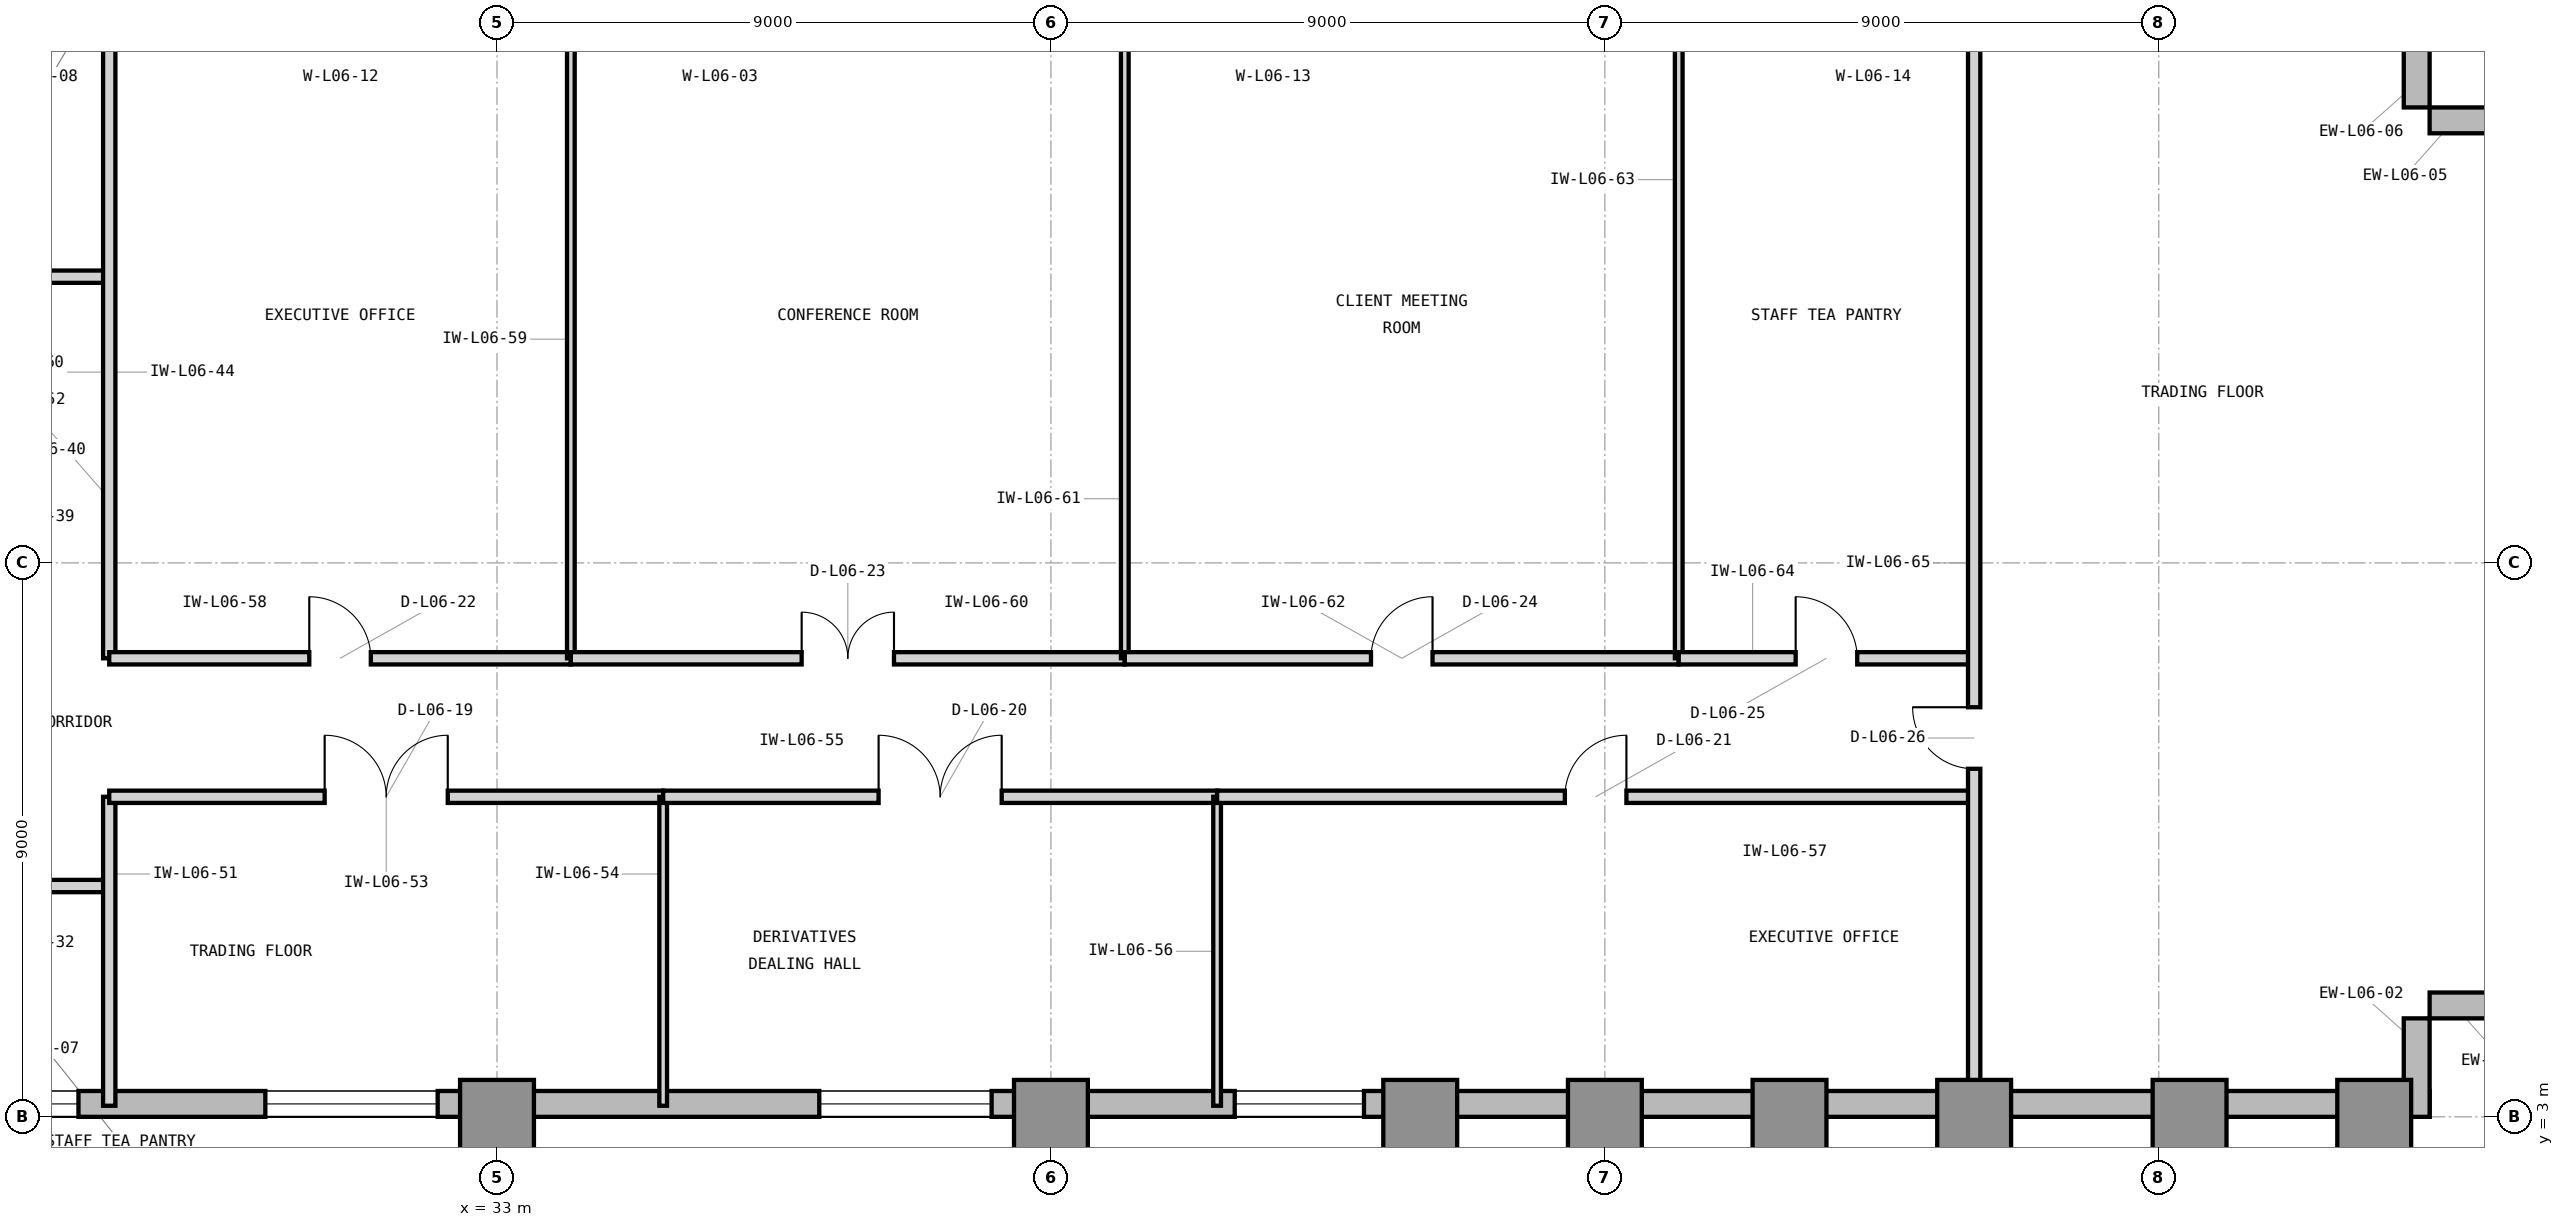
"""IFC4 building model, lengths in metres.
Left out: names, types, materials, properties, quantities, classifications, styles, units other than length and angle.
Written with IfcOpenShell. Run it as: python <this file> out.ifc"""

import sys

from ifc_helpers import new_model, si_unit, direction, frame, frame_2d, origin, origin_2d, place, context, subcontext, project, spatial, rectangle, extrude, element, fill, save


model = new_model("IFC4")
c1 = context("Model", 3, precision=1e-05, world=origin(), true_north=direction((0.0, 1.0)))
c2 = subcontext(c1, "Body", "Model", "MODEL_VIEW")
j1 = project(units=[si_unit("LENGTHUNIT", "METRE"), si_unit("PLANEANGLEUNIT", "RADIAN")], contexts=[c1])
p1 = place(None, origin())
s1 = spatial("IfcSite", under=j1, at=p1, CompositionType="ELEMENT")
p2 = place(p1, origin())
s2 = spatial("IfcBuilding", under=s1, at=p2, CompositionType="ELEMENT")
p3 = place(p2, frame((0.0, 0.0, 30.0)))
s3 = spatial("IfcBuildingStorey", under=s2, at=p3, CompositionType="ELEMENT", Elevation=30.0)
for number, where, z_axis, x_axis in (
    (1, (33.0, 3.0, 0.0), (0.0, 0.0, 1.0), (1.0, 0.0, 0.0)),
    (2, (42.0, 3.0, 0.0), (0.0, 0.0, 1.0), (1.0, 0.0, 0.0)),
    (3, (48.0, 3.0, 0.0), (0.0, 0.0, 1.0), (1.0, 0.0, 0.0)),
    (4, (51.0, 3.0, 0.0), (0.0, 0.0, 1.0), (1.0, 0.0, 0.0)),
    (5, (54.0, 3.0, 0.0), (0.0, 0.0, 1.0), (1.0, 0.0, 0.0)),
    (6, (57.0, 3.0, 0.0), (0.0, 0.0, 1.0), (1.0, 0.0, 0.0)),
    (7, (60.5, 3.0, 0.0), (0.0, 0.0, 1.0), (1.0, 0.0, 0.0)),
    (8, (63.5, 3.0, 0.0), (0.0, 0.0, 1.0), (1.0, 0.0, 0.0)),
):
    element("IfcColumn", number, at=place(p3, frame(where, z_axis=z_axis, x_axis=x_axis)), inside=s3, PredefinedType="COLUMN", context=c2, shape_type="SweptSolid", body=[
        extrude(rectangle(XDim=1.2, YDim=1.2, at=origin_2d()), origin(), (0.0, 0.0, 1.0), 4.2),
    ])
p4 = place(p3, frame((23.9, 3.21, 0.0), z_axis=(0.0, 0.0, 1.0), x_axis=(1.0, 0.0, 0.0)))
e9 = element("IfcWall", 9, at=p4, inside=s3, PredefinedType="STANDARD", context=c2, shape_type="SweptSolid", body=[
    extrude(rectangle(XDim=40.5, YDim=0.42, at=frame_2d((20.25, 0.0))), origin(), (0.0, 0.0, 1.0), 3.98),
])
p5 = place(p4, frame((1.1, 0.0, 0.85)))
e10 = element("IfcOpeningElement", 10, at=p5, cuts=e9, PredefinedType="OPENING", context=c2, shape_type="SweptSolid", body=[
    extrude(rectangle(XDim=1.2, YDim=2.45, at=frame_2d((0.6, 1.225))), frame((0.0, 0.22, 0.0), z_axis=(0.0, -1.0, 0.0), x_axis=(1.0, 0.0, 0.0)), (0.0, 0.0, 1.0), 0.44),
])
p6 = place(p4, frame((5.336, 0.0, 0.85)))
e11 = element("IfcOpeningElement", 11, at=p6, cuts=e9, PredefinedType="OPENING", context=c2, shape_type="SweptSolid", body=[
    extrude(rectangle(XDim=2.8, YDim=2.45, at=frame_2d((1.4, 1.225))), frame((0.0, 0.22, 0.0), z_axis=(0.0, -1.0, 0.0), x_axis=(1.0, 0.0, 0.0)), (0.0, 0.0, 1.0), 0.44),
])
p7 = place(p4, frame((14.336, 0.0, 0.85)))
e12 = element("IfcOpeningElement", 12, at=p7, cuts=e9, PredefinedType="OPENING", context=c2, shape_type="SweptSolid", body=[
    extrude(rectangle(XDim=2.8, YDim=2.45, at=frame_2d((1.4, 1.225))), frame((0.0, 0.22, 0.0), z_axis=(0.0, -1.0, 0.0), x_axis=(1.0, 0.0, 0.0)), (0.0, 0.0, 1.0), 0.44),
])
p8 = place(p4, frame((21.086, 0.0, 0.85)))
e13 = element("IfcOpeningElement", 13, at=p8, cuts=e9, PredefinedType="OPENING", context=c2, shape_type="SweptSolid", body=[
    extrude(rectangle(XDim=2.1, YDim=2.45, at=frame_2d((1.05, 1.225))), frame((0.0, 0.22, 0.0), z_axis=(0.0, -1.0, 0.0), x_axis=(1.0, 0.0, 0.0)), (0.0, 0.0, 1.0), 0.44),
])
for number, where, z_axis, x_axis in (
    (14, (64.19, 3.0, 0.0), (0.0, 0.0, 1.0), (0.0, 1.0, 0.0)),
    (15, (64.4, 4.81, 0.0), (0.0, 0.0, 1.0), (1.0, 0.0, 0.0)),
    (16, (66.0, 19.19, 0.0), (0.0, 0.0, 1.0), (-1.0, 0.0, 0.0)),
    (17, (64.19, 19.4, 0.0), (0.0, 0.0, 1.0), (0.0, 1.0, 0.0)),
):
    element("IfcWall", number, at=place(p3, frame(where, z_axis=z_axis, x_axis=x_axis)), inside=s3, PredefinedType="STANDARD", context=c2, shape_type="SweptSolid", body=[
        extrude(rectangle(XDim=1.6, YDim=0.42, at=frame_2d((0.8, 0.0))), origin(), (0.0, 0.0, 1.0), 3.98),
    ])
p9 = place(p3, frame((23.85, 6.75, 0.0), z_axis=(0.0, 0.0, 1.0), x_axis=(1.0, 0.0, 0.0)))
e18 = element("IfcWall", 18, at=p9, inside=s3, PredefinedType="PARTITIONING", context=c2, shape_type="SweptSolid", body=[
    extrude(rectangle(XDim=2.85, YDim=0.2, at=frame_2d((1.425, 0.0))), origin(), (0.0, 0.0, 1.0), 3.97),
])
p10 = place(p9, frame((0.7, 0.0, 0.0)))
e19 = element("IfcOpeningElement", 19, at=p10, cuts=e18, PredefinedType="OPENING", context=c2, shape_type="SweptSolid", body=[
    extrude(rectangle(XDim=1.0, YDim=2.15, at=frame_2d((0.5, 1.075))), frame((0.0, 0.11, 0.0), z_axis=(0.0, -1.0, 0.0), x_axis=(1.0, 0.0, 0.0)), (0.0, 0.0, 1.0), 0.22),
])
p11 = place(p3, frame((23.85, 16.65, 0.0), z_axis=(0.0, 0.0, 1.0), x_axis=(1.0, 0.0, 0.0)))
e20 = element("IfcWall", 20, at=p11, inside=s3, PredefinedType="PARTITIONING", context=c2, shape_type="SweptSolid", body=[
    extrude(rectangle(XDim=2.85, YDim=0.2, at=frame_2d((1.425, 0.0))), origin(), (0.0, 0.0, 1.0), 3.97),
])
p12 = place(p11, frame((0.7, 0.0, 0.0)))
e21 = element("IfcOpeningElement", 21, at=p12, cuts=e20, PredefinedType="OPENING", context=c2, shape_type="SweptSolid", body=[
    extrude(rectangle(XDim=1.0, YDim=2.15, at=frame_2d((0.5, 1.075))), frame((0.0, 0.11, 0.0), z_axis=(0.0, -1.0, 0.0), x_axis=(1.0, 0.0, 0.0)), (0.0, 0.0, 1.0), 0.22),
])
p13 = place(p3, frame((26.7, 3.18, 0.0), z_axis=(0.0, 0.0, 1.0), x_axis=(0.0, 1.0, 0.0)))
e22 = element("IfcWall", 22, at=p13, inside=s3, PredefinedType="PARTITIONING", context=c2, shape_type="SweptSolid", body=[
    extrude(rectangle(XDim=5.02, YDim=0.2, at=frame_2d((2.51, 0.0))), origin(), (0.0, 0.0, 1.0), 3.97),
])
p14 = place(p3, frame((26.7, 10.45, 0.0), z_axis=(0.0, 0.0, 1.0), x_axis=(0.0, 1.0, 0.0)))
e23 = element("IfcWall", 23, at=p14, inside=s3, PredefinedType="PARTITIONING", context=c2, shape_type="SweptSolid", body=[
    extrude(rectangle(XDim=10.37, YDim=0.2, at=frame_2d((5.185, 0.0))), origin(), (0.0, 0.0, 1.0), 3.97),
])
p15 = place(p3, frame((26.7, 8.2, 0.0), z_axis=(0.0, 0.0, 1.0), x_axis=(1.0, 0.0, 0.0)))
e24 = element("IfcWall", 24, at=p15, inside=s3, PredefinedType="PARTITIONING", context=c2, shape_type="SweptSolid", body=[
    extrude(rectangle(XDim=9.0, YDim=0.2, at=frame_2d((4.5, 0.0))), origin(), (0.0, 0.0, 1.0), 3.97),
])
p16 = place(p15, frame((3.5, 0.0, 0.0)))
e25 = element("IfcOpeningElement", 25, at=p16, cuts=e24, PredefinedType="OPENING", context=c2, shape_type="SweptSolid", body=[
    extrude(rectangle(XDim=2.0, YDim=2.5, at=frame_2d((1.0, 1.25))), frame((0.0, 0.11, 0.0), z_axis=(0.0, -1.0, 0.0), x_axis=(1.0, 0.0, 0.0)), (0.0, 0.0, 1.0), 0.22),
])
p17 = place(p3, frame((35.7, 3.18, 0.0), z_axis=(0.0, 0.0, 1.0), x_axis=(0.0, 1.0, 0.0)))
e26 = element("IfcWall", 26, at=p17, inside=s3, PredefinedType="PARTITIONING", context=c2, shape_type="SweptSolid", body=[
    extrude(rectangle(XDim=5.02, YDim=0.125, at=frame_2d((2.51, 0.0))), origin(), (0.0, 0.0, 1.0), 3.97),
])
p18 = place(p3, frame((35.7, 8.2, 0.0), z_axis=(0.0, 0.0, 1.0), x_axis=(1.0, 0.0, 0.0)))
e27 = element("IfcWall", 27, at=p18, inside=s3, PredefinedType="PARTITIONING", context=c2, shape_type="SweptSolid", body=[
    extrude(rectangle(XDim=9.0, YDim=0.2, at=frame_2d((4.5, 0.0))), origin(), (0.0, 0.0, 1.0), 3.97),
])
p19 = place(p18, frame((3.5, 0.0, 0.0)))
e28 = element("IfcOpeningElement", 28, at=p19, cuts=e27, PredefinedType="OPENING", context=c2, shape_type="SweptSolid", body=[
    extrude(rectangle(XDim=2.0, YDim=2.5, at=frame_2d((1.0, 1.25))), frame((0.0, 0.11, 0.0), z_axis=(0.0, -1.0, 0.0), x_axis=(1.0, 0.0, 0.0)), (0.0, 0.0, 1.0), 0.22),
])
p20 = place(p3, frame((44.7, 3.18, 0.0), z_axis=(0.0, 0.0, 1.0), x_axis=(0.0, 1.0, 0.0)))
e29 = element("IfcWall", 29, at=p20, inside=s3, PredefinedType="PARTITIONING", context=c2, shape_type="SweptSolid", body=[
    extrude(rectangle(XDim=5.02, YDim=0.125, at=frame_2d((2.51, 0.0))), origin(), (0.0, 0.0, 1.0), 3.97),
])
p21 = place(p3, frame((44.7, 8.2, 0.0), z_axis=(0.0, 0.0, 1.0), x_axis=(1.0, 0.0, 0.0)))
e30 = element("IfcWall", 30, at=p21, inside=s3, PredefinedType="PARTITIONING", context=c2, shape_type="SweptSolid", body=[
    extrude(rectangle(XDim=12.3, YDim=0.2, at=frame_2d((6.15, 0.0))), origin(), (0.0, 0.0, 1.0), 3.97),
])
p22 = place(p21, frame((5.65, 0.0, 0.0)))
e31 = element("IfcOpeningElement", 31, at=p22, cuts=e30, PredefinedType="OPENING", context=c2, shape_type="SweptSolid", body=[
    extrude(rectangle(XDim=1.0, YDim=2.15, at=frame_2d((0.5, 1.075))), frame((0.0, 0.11, 0.0), z_axis=(0.0, -1.0, 0.0), x_axis=(1.0, 0.0, 0.0)), (0.0, 0.0, 1.0), 0.22),
])
p23 = place(p3, frame((26.7, 10.45, 0.0), z_axis=(0.0, 0.0, 1.0), x_axis=(1.0, 0.0, 0.0)))
e32 = element("IfcWall", 32, at=p23, inside=s3, PredefinedType="PARTITIONING", context=c2, shape_type="SweptSolid", body=[
    extrude(rectangle(XDim=7.5, YDim=0.2, at=frame_2d((3.75, 0.0))), origin(), (0.0, 0.0, 1.0), 3.97),
])
p24 = place(p23, frame((3.25, 0.0, 0.0)))
e33 = element("IfcOpeningElement", 33, at=p24, cuts=e32, PredefinedType="OPENING", context=c2, shape_type="SweptSolid", body=[
    extrude(rectangle(XDim=1.0, YDim=2.15, at=frame_2d((0.5, 1.075))), frame((0.0, 0.11, 0.0), z_axis=(0.0, -1.0, 0.0), x_axis=(1.0, 0.0, 0.0)), (0.0, 0.0, 1.0), 0.22),
])
p25 = place(p3, frame((34.2, 10.45, 0.0), z_axis=(0.0, 0.0, 1.0), x_axis=(0.0, 1.0, 0.0)))
e34 = element("IfcWall", 34, at=p25, inside=s3, PredefinedType="PARTITIONING", context=c2, shape_type="SweptSolid", body=[
    extrude(rectangle(XDim=10.37, YDim=0.125, at=frame_2d((5.185, 0.0))), origin(), (0.0, 0.0, 1.0), 3.97),
])
p26 = place(p3, frame((34.2, 10.45, 0.0), z_axis=(0.0, 0.0, 1.0), x_axis=(1.0, 0.0, 0.0)))
e35 = element("IfcWall", 35, at=p26, inside=s3, PredefinedType="PARTITIONING", context=c2, shape_type="SweptSolid", body=[
    extrude(rectangle(XDim=9.0, YDim=0.2, at=frame_2d((4.5, 0.0))), origin(), (0.0, 0.0, 1.0), 3.97),
])
p27 = place(p26, frame((3.75, 0.0, 0.0)))
e36 = element("IfcOpeningElement", 36, at=p27, cuts=e35, PredefinedType="OPENING", context=c2, shape_type="SweptSolid", body=[
    extrude(rectangle(XDim=1.5, YDim=2.3, at=frame_2d((0.75, 1.15))), frame((0.0, 0.11, 0.0), z_axis=(0.0, -1.0, 0.0), x_axis=(1.0, 0.0, 0.0)), (0.0, 0.0, 1.0), 0.22),
])
p28 = place(p3, frame((43.2, 10.45, 0.0), z_axis=(0.0, 0.0, 1.0), x_axis=(0.0, 1.0, 0.0)))
e37 = element("IfcWall", 37, at=p28, inside=s3, PredefinedType="PARTITIONING", context=c2, shape_type="SweptSolid", body=[
    extrude(rectangle(XDim=10.37, YDim=0.125, at=frame_2d((5.185, 0.0))), origin(), (0.0, 0.0, 1.0), 3.97),
])
p29 = place(p3, frame((43.2, 10.45, 0.0), z_axis=(0.0, 0.0, 1.0), x_axis=(1.0, 0.0, 0.0)))
e38 = element("IfcWall", 38, at=p29, inside=s3, PredefinedType="PARTITIONING", context=c2, shape_type="SweptSolid", body=[
    extrude(rectangle(XDim=9.0, YDim=0.2, at=frame_2d((4.5, 0.0))), origin(), (0.0, 0.0, 1.0), 3.97),
])
p30 = place(p29, frame((4.0, 0.0, 0.0)))
e39 = element("IfcOpeningElement", 39, at=p30, cuts=e38, PredefinedType="OPENING", context=c2, shape_type="SweptSolid", body=[
    extrude(rectangle(XDim=1.0, YDim=2.15, at=frame_2d((0.5, 1.075))), frame((0.0, 0.11, 0.0), z_axis=(0.0, -1.0, 0.0), x_axis=(1.0, 0.0, 0.0)), (0.0, 0.0, 1.0), 0.22),
])
p31 = place(p3, frame((52.2, 10.45, 0.0), z_axis=(0.0, 0.0, 1.0), x_axis=(0.0, 1.0, 0.0)))
e40 = element("IfcWall", 40, at=p31, inside=s3, PredefinedType="PARTITIONING", context=c2, shape_type="SweptSolid", body=[
    extrude(rectangle(XDim=10.37, YDim=0.125, at=frame_2d((5.185, 0.0))), origin(), (0.0, 0.0, 1.0), 3.97),
])
p32 = place(p3, frame((52.2, 10.45, 0.0), z_axis=(0.0, 0.0, 1.0), x_axis=(1.0, 0.0, 0.0)))
e41 = element("IfcWall", 41, at=p32, inside=s3, PredefinedType="PARTITIONING", context=c2, shape_type="SweptSolid", body=[
    extrude(rectangle(XDim=4.8, YDim=0.2, at=frame_2d((2.4, 0.0))), origin(), (0.0, 0.0, 1.0), 3.97),
])
p33 = place(p32, frame((1.9, 0.0, 0.0)))
e42 = element("IfcOpeningElement", 42, at=p33, cuts=e41, PredefinedType="OPENING", context=c2, shape_type="SweptSolid", body=[
    extrude(rectangle(XDim=1.0, YDim=2.15, at=frame_2d((0.5, 1.075))), frame((0.0, 0.11, 0.0), z_axis=(0.0, -1.0, 0.0), x_axis=(1.0, 0.0, 0.0)), (0.0, 0.0, 1.0), 0.22),
])
p34 = place(p3, frame((57.0, 3.18, 0.0), z_axis=(0.0, 0.0, 1.0), x_axis=(0.0, 1.0, 0.0)))
e43 = element("IfcWall", 43, at=p34, inside=s3, PredefinedType="PARTITIONING", context=c2, shape_type="SweptSolid", body=[
    extrude(rectangle(XDim=17.64, YDim=0.2, at=frame_2d((8.82, 0.0))), origin(), (0.0, 0.0, 1.0), 3.114),
])
p35 = place(p34, frame((5.475, 0.0, 0.0)))
e44 = element("IfcOpeningElement", 44, at=p35, cuts=e43, PredefinedType="OPENING", context=c2, shape_type="SweptSolid", body=[
    extrude(rectangle(XDim=1.0, YDim=2.15, at=frame_2d((0.5, 1.075))), frame((0.0, 0.11, 0.0), z_axis=(0.0, -1.0, 0.0), x_axis=(1.0, 0.0, 0.0)), (0.0, 0.0, 1.0), 0.22),
])
p36 = place(p16, origin())
e45 = element("IfcDoor", 45, at=p36, inside=s3, OperationType="DOUBLE_DOOR_SINGLE_SWING", PredefinedType="DOOR", context=c2, shape_type="SweptSolid", body=[
    extrude(rectangle(XDim=2.0, YDim=2.5, at=frame_2d((1.0, 1.25))), frame((0.0, 0.025, 0.0), z_axis=(0.0, -1.0, 0.0), x_axis=(1.0, 0.0, 0.0)), (0.0, 0.0, 1.0), 0.05),
])
fill(e25, e45)
p37 = place(p19, origin())
e46 = element("IfcDoor", 46, at=p37, inside=s3, OperationType="DOUBLE_DOOR_SINGLE_SWING", PredefinedType="DOOR", context=c2, shape_type="SweptSolid", body=[
    extrude(rectangle(XDim=2.0, YDim=2.5, at=frame_2d((1.0, 1.25))), frame((0.0, 0.025, 0.0), z_axis=(0.0, -1.0, 0.0), x_axis=(1.0, 0.0, 0.0)), (0.0, 0.0, 1.0), 0.05),
])
fill(e28, e46)
p38 = place(p22, origin())
e47 = element("IfcDoor", 47, at=p38, inside=s3, OperationType="SINGLE_SWING_RIGHT", PredefinedType="DOOR", context=c2, shape_type="SweptSolid", body=[
    extrude(rectangle(XDim=1.0, YDim=2.15, at=frame_2d((0.5, 1.075))), frame((0.0, 0.025, 0.0), z_axis=(0.0, -1.0, 0.0), x_axis=(1.0, 0.0, 0.0)), (0.0, 0.0, 1.0), 0.05),
])
fill(e31, e47)
p39 = place(p24, origin())
e48 = element("IfcDoor", 48, at=p39, inside=s3, OperationType="SINGLE_SWING_LEFT", PredefinedType="DOOR", context=c2, shape_type="SweptSolid", body=[
    extrude(rectangle(XDim=1.0, YDim=2.15, at=frame_2d((0.5, 1.075))), frame((0.0, 0.025, 0.0), z_axis=(0.0, -1.0, 0.0), x_axis=(1.0, 0.0, 0.0)), (0.0, 0.0, 1.0), 0.05),
])
fill(e33, e48)
p40 = place(p27, origin())
e49 = element("IfcDoor", 49, at=p40, inside=s3, OperationType="DOUBLE_DOOR_SINGLE_SWING", PredefinedType="DOOR", context=c2, shape_type="SweptSolid", body=[
    extrude(rectangle(XDim=1.5, YDim=2.3, at=frame_2d((0.75, 1.15))), frame((0.0, 0.025, 0.0), z_axis=(0.0, -1.0, 0.0), x_axis=(1.0, 0.0, 0.0)), (0.0, 0.0, 1.0), 0.05),
])
fill(e36, e49)
p41 = place(p30, origin())
e50 = element("IfcDoor", 50, at=p41, inside=s3, OperationType="SINGLE_SWING_RIGHT", PredefinedType="DOOR", context=c2, shape_type="SweptSolid", body=[
    extrude(rectangle(XDim=1.0, YDim=2.15, at=frame_2d((0.5, 1.075))), frame((0.0, 0.025, 0.0), z_axis=(0.0, -1.0, 0.0), x_axis=(1.0, 0.0, 0.0)), (0.0, 0.0, 1.0), 0.05),
])
fill(e39, e50)
p42 = place(p33, origin())
e51 = element("IfcDoor", 51, at=p42, inside=s3, OperationType="SINGLE_SWING_LEFT", PredefinedType="DOOR", context=c2, shape_type="SweptSolid", body=[
    extrude(rectangle(XDim=1.0, YDim=2.15, at=frame_2d((0.5, 1.075))), frame((0.0, 0.025, 0.0), z_axis=(0.0, -1.0, 0.0), x_axis=(1.0, 0.0, 0.0)), (0.0, 0.0, 1.0), 0.05),
])
fill(e42, e51)
p43 = place(p35, origin())
e52 = element("IfcDoor", 52, at=p43, inside=s3, OperationType="SINGLE_SWING_RIGHT", PredefinedType="DOOR", context=c2, shape_type="SweptSolid", body=[
    extrude(rectangle(XDim=1.0, YDim=2.15, at=frame_2d((0.5, 1.075))), frame((0.0, 0.025, 0.0), z_axis=(0.0, -1.0, 0.0), x_axis=(1.0, 0.0, 0.0)), (0.0, 0.0, 1.0), 0.05),
])
fill(e44, e52)
p44 = place(p5, origin())
e53 = element("IfcWindow", 53, at=p44, inside=s3, PartitioningType="SINGLE_PANEL", PredefinedType="WINDOW", context=c2, shape_type="SweptSolid", body=[
    extrude(rectangle(XDim=1.2, YDim=2.45, at=frame_2d((0.6, 1.225))), frame((0.0, 0.11, 0.0), z_axis=(0.0, -1.0, 0.0), x_axis=(1.0, 0.0, 0.0)), (0.0, 0.0, 1.0), 0.06),
])
fill(e10, e53)
p45 = place(p6, origin())
e54 = element("IfcWindow", 54, at=p45, inside=s3, PartitioningType="SINGLE_PANEL", PredefinedType="WINDOW", context=c2, shape_type="SweptSolid", body=[
    extrude(rectangle(XDim=2.8, YDim=2.45, at=frame_2d((1.4, 1.225))), frame((0.0, 0.11, 0.0), z_axis=(0.0, -1.0, 0.0), x_axis=(1.0, 0.0, 0.0)), (0.0, 0.0, 1.0), 0.06),
])
fill(e11, e54)
p46 = place(p7, origin())
e55 = element("IfcWindow", 55, at=p46, inside=s3, PartitioningType="SINGLE_PANEL", PredefinedType="WINDOW", context=c2, shape_type="SweptSolid", body=[
    extrude(rectangle(XDim=2.8, YDim=2.45, at=frame_2d((1.4, 1.225))), frame((0.0, 0.11, 0.0), z_axis=(0.0, -1.0, 0.0), x_axis=(1.0, 0.0, 0.0)), (0.0, 0.0, 1.0), 0.06),
])
fill(e12, e55)
p47 = place(p8, origin())
e56 = element("IfcWindow", 56, at=p47, inside=s3, PartitioningType="SINGLE_PANEL", PredefinedType="WINDOW", context=c2, shape_type="SweptSolid", body=[
    extrude(rectangle(XDim=2.1, YDim=2.45, at=frame_2d((1.05, 1.225))), frame((0.0, 0.11, 0.0), z_axis=(0.0, -1.0, 0.0), x_axis=(1.0, 0.0, 0.0)), (0.0, 0.0, 1.0), 0.06),
])
fill(e13, e56)
save(model, sys.argv[1])
